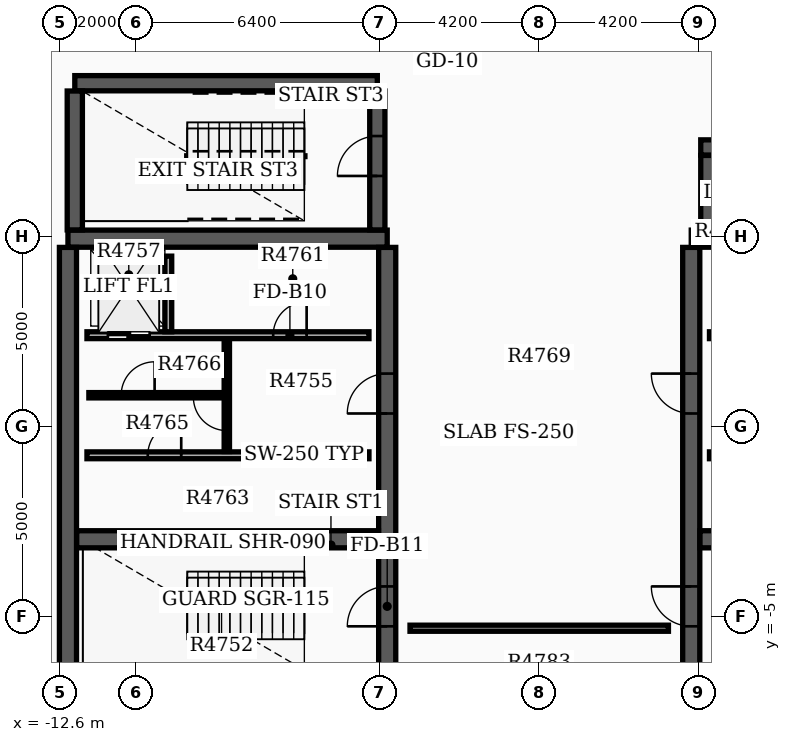
"""IFC4 building model, lengths in metres.
Left out: names, types, materials, properties, quantities, classifications, styles, units other than length and angle.
Written with IfcOpenShell. Run it as: python <this file> out.ifc"""

import sys

from ifc_helpers import new_model, si_unit, direction, frame, frame_2d, origin, place, context, subcontext, project, spatial, rectangle, extrude, element, fill, save


model = new_model("IFC4")
c1 = context("Model", 3, precision=1e-05, world=origin(), true_north=direction((0.0, 1.0)))
c2 = subcontext(c1, "Body", "Model", "MODEL_VIEW")
j1 = project(units=[si_unit("LENGTHUNIT", "METRE"), si_unit("PLANEANGLEUNIT", "RADIAN")], contexts=[c1])
p1 = place(None, origin())
s1 = spatial("IfcSite", under=j1, at=p1, CompositionType="ELEMENT")
p2 = place(p1, origin())
s2 = spatial("IfcBuilding", under=s1, at=p2, CompositionType="ELEMENT")
p3 = place(p2, frame((0.0, 0.0, 312.9)))
s3 = spatial("IfcBuildingStorey", under=s2, at=p3, CompositionType="ELEMENT", Elevation=312.9)
p4 = place(p3, frame((-12.4, 4.95, 0.0), z_axis=(0.0, 0.0, 1.0), x_axis=(1.0, 0.0, 0.0)))
e1 = element("IfcWall", 1, at=p4, inside=s3, PredefinedType="SHEAR", context=c2, shape_type="SweptSolid", body=[
    extrude(rectangle(XDim=8.4, YDim=0.45, at=frame_2d((4.2, 0.0))), origin(), (0.0, 0.0, 1.0), 4.25),
])
p5 = place(p3, frame((-12.4, -6.62, 0.0), z_axis=(0.0, 0.0, 1.0), x_axis=(0.0, 1.0, 0.0)))
e2 = element("IfcWall", 2, at=p5, inside=s3, PredefinedType="SHEAR", context=c2, shape_type="SweptSolid", body=[
    extrude(rectangle(XDim=11.34, YDim=0.45, at=frame_2d((5.67, 0.0))), origin(), (0.0, 0.0, 1.0), 4.25),
])
p6 = place(p3, frame((-4.0, -6.62, 0.0), z_axis=(0.0, 0.0, 1.0), x_axis=(0.0, 1.0, 0.0)))
e3 = element("IfcWall", 3, at=p6, inside=s3, PredefinedType="SHEAR", context=c2, shape_type="SweptSolid", body=[
    extrude(rectangle(XDim=11.34, YDim=0.45, at=frame_2d((5.67, 0.0))), origin(), (0.0, 0.0, 1.0), 4.25),
])
p7 = place(p6, frame((1.37, 0.0, 0.0)))
e4 = element("IfcOpeningElement", 4, at=p7, cuts=e3, PredefinedType="OPENING", context=c2, shape_type="SweptSolid", body=[
    extrude(rectangle(XDim=1.05, YDim=2.15, at=frame_2d((0.525, 1.075))), frame((0.0, 0.235, 0.0), z_axis=(0.0, -1.0, 0.0), x_axis=(1.0, 0.0, 0.0)), (0.0, 0.0, 1.0), 0.47),
])
p8 = place(p6, frame((6.97, 0.0, 0.0)))
e5 = element("IfcOpeningElement", 5, at=p8, cuts=e3, PredefinedType="OPENING", context=c2, shape_type="SweptSolid", body=[
    extrude(rectangle(XDim=1.05, YDim=2.15, at=frame_2d((0.525, 1.075))), frame((0.0, 0.235, 0.0), z_axis=(0.0, -1.0, 0.0), x_axis=(1.0, 0.0, 0.0)), (0.0, 0.0, 1.0), 0.47),
])
p9 = place(p3, frame((-12.17, -2.96, 0.0), z_axis=(0.0, 0.0, 1.0), x_axis=(1.0, 0.0, 0.0)))
e6 = element("IfcWall", 6, at=p9, inside=s3, PredefinedType="SHEAR", context=c2, shape_type="SweptSolid", body=[
    extrude(rectangle(XDim=7.94, YDim=0.45, at=frame_2d((3.97, 0.0))), origin(), (0.0, 0.0, 1.0), 4.25),
])
p10 = place(p3, frame((4.0, 4.95, 0.0), z_axis=(0.0, 0.0, 1.0), x_axis=(1.0, 0.0, 0.0)))
e7 = element("IfcWall", 7, at=p10, inside=s3, PredefinedType="SHEAR", context=c2, shape_type="SweptSolid", body=[
    extrude(rectangle(XDim=8.4, YDim=0.45, at=frame_2d((4.2, 0.0))), origin(), (0.0, 0.0, 1.0), 4.25),
])
p11 = place(p3, frame((4.0, -6.62, 0.0), z_axis=(0.0, 0.0, 1.0), x_axis=(0.0, 1.0, 0.0)))
e8 = element("IfcWall", 8, at=p11, inside=s3, PredefinedType="SHEAR", context=c2, shape_type="SweptSolid", body=[
    extrude(rectangle(XDim=11.34, YDim=0.45, at=frame_2d((5.67, 0.0))), origin(), (0.0, 0.0, 1.0), 4.25),
])
p12 = place(p11, frame((1.37, 0.0, 0.0)))
e9 = element("IfcOpeningElement", 9, at=p12, cuts=e8, PredefinedType="OPENING", context=c2, shape_type="SweptSolid", body=[
    extrude(rectangle(XDim=1.05, YDim=2.15, at=frame_2d((0.525, 1.075))), frame((0.0, 0.235, 0.0), z_axis=(0.0, -1.0, 0.0), x_axis=(1.0, 0.0, 0.0)), (0.0, 0.0, 1.0), 0.47),
])
p13 = place(p11, frame((6.97, 0.0, 0.0)))
e10 = element("IfcOpeningElement", 10, at=p13, cuts=e8, PredefinedType="OPENING", context=c2, shape_type="SweptSolid", body=[
    extrude(rectangle(XDim=1.05, YDim=2.15, at=frame_2d((0.525, 1.075))), frame((0.0, 0.235, 0.0), z_axis=(0.0, -1.0, 0.0), x_axis=(1.0, 0.0, 0.0)), (0.0, 0.0, 1.0), 0.47),
])
p14 = place(p3, frame((4.23, -2.96, 0.0), z_axis=(0.0, 0.0, 1.0), x_axis=(1.0, 0.0, 0.0)))
e11 = element("IfcWall", 11, at=p14, inside=s3, PredefinedType="SHEAR", context=c2, shape_type="SweptSolid", body=[
    extrude(rectangle(XDim=7.94, YDim=0.45, at=frame_2d((3.97, 0.0))), origin(), (0.0, 0.0, 1.0), 4.25),
])
p15 = place(p3, frame((-12.22, 9.04, 0.0), z_axis=(0.0, 0.0, 1.0), x_axis=(1.0, 0.0, 0.0)))
e12 = element("IfcWall", 12, at=p15, inside=s3, PredefinedType="SHEAR", context=c2, shape_type="SweptSolid", body=[
    extrude(rectangle(XDim=7.96, YDim=0.4, at=frame_2d((3.98, 0.0))), origin(), (0.0, 0.0, 1.0), 4.25),
])
p16 = place(p3, frame((-12.22, 5.18, 0.0), z_axis=(0.0, 0.0, 1.0), x_axis=(0.0, 1.0, 0.0)))
e13 = element("IfcWall", 13, at=p16, inside=s3, PredefinedType="SHEAR", context=c2, shape_type="SweptSolid", body=[
    extrude(rectangle(XDim=3.655, YDim=0.4, at=frame_2d((1.828, 0.0))), origin(), (0.0, 0.0, 1.0), 4.25),
])
p17 = place(p3, frame((-4.26, 5.18, 0.0), z_axis=(0.0, 0.0, 1.0), x_axis=(0.0, 1.0, 0.0)))
e14 = element("IfcWall", 14, at=p17, inside=s3, PredefinedType="SHEAR", context=c2, shape_type="SweptSolid", body=[
    extrude(rectangle(XDim=3.655, YDim=0.4, at=frame_2d((1.828, 0.0))), origin(), (0.0, 0.0, 1.0), 4.25),
])
p18 = place(p17, frame((1.42, 0.0, 0.0)))
e15 = element("IfcOpeningElement", 15, at=p18, cuts=e14, PredefinedType="OPENING", context=c2, shape_type="SweptSolid", body=[
    extrude(rectangle(XDim=1.05, YDim=2.15, at=frame_2d((0.525, 1.075))), frame((0.0, 0.21, 0.0), z_axis=(0.0, -1.0, 0.0), x_axis=(1.0, 0.0, 0.0)), (0.0, 0.0, 1.0), 0.42),
])
p19 = place(p3, frame((4.45, 5.18, 0.0), z_axis=(0.0, 0.0, 1.0), x_axis=(0.0, 1.0, 0.0)))
e16 = element("IfcWall", 16, at=p19, inside=s3, PredefinedType="SHEAR", context=c2, shape_type="SweptSolid", body=[
    extrude(rectangle(XDim=1.96, YDim=0.4, at=frame_2d((0.98, 0.0))), origin(), (0.0, 0.0, 1.0), 4.25),
])
p20 = place(p3, frame((4.25, 7.35, 0.0), z_axis=(0.0, 0.0, 1.0), x_axis=(1.0, 0.0, 0.0)))
e17 = element("IfcWall", 17, at=p20, inside=s3, PredefinedType="SHEAR", context=c2, shape_type="SweptSolid", body=[
    extrude(rectangle(XDim=5.4, YDim=0.4, at=frame_2d((2.7, 0.0))), origin(), (0.0, 0.0, 1.0), 4.25),
])
p21 = place(p20, frame((0.85, 0.0, 0.0)))
e18 = element("IfcOpeningElement", 18, at=p21, cuts=e17, PredefinedType="OPENING", context=c2, shape_type="SweptSolid", body=[
    extrude(rectangle(XDim=1.2, YDim=2.2, at=frame_2d((0.6, 1.1))), frame((0.0, 0.21, 0.0), z_axis=(0.0, -1.0, 0.0), x_axis=(1.0, 0.0, 0.0)), (0.0, 0.0, 1.0), 0.42),
])
p22 = place(p20, frame((3.25, 0.0, 0.0)))
e19 = element("IfcOpeningElement", 19, at=p22, cuts=e17, PredefinedType="OPENING", context=c2, shape_type="SweptSolid", body=[
    extrude(rectangle(XDim=1.2, YDim=2.2, at=frame_2d((0.6, 1.1))), frame((0.0, 0.21, 0.0), z_axis=(0.0, -1.0, 0.0), x_axis=(1.0, 0.0, 0.0)), (0.0, 0.0, 1.0), 0.42),
])
p23 = place(p3, frame((-11.9, 2.41, 0.0), z_axis=(0.0, 0.0, 1.0), x_axis=(1.0, 0.0, 0.0)))
e20 = element("IfcWall", 20, at=p23, inside=s3, PredefinedType="SOLIDWALL", context=c2, shape_type="SweptSolid", body=[
    extrude(rectangle(XDim=7.42, YDim=0.18, at=frame_2d((3.71, 0.0))), origin(), (0.0, 0.0, 1.0), 3.72),
])
p24 = place(p23, frame((0.55, 0.0, 0.0)))
e21 = element("IfcOpeningElement", 21, at=p24, cuts=e20, PredefinedType="OPENING", context=c2, shape_type="SweptSolid", body=[
    extrude(rectangle(XDim=1.1, YDim=2.15, at=frame_2d((0.55, 1.075))), frame((0.0, 0.1, 0.0), z_axis=(0.0, -1.0, 0.0), x_axis=(1.0, 0.0, 0.0)), (0.0, 0.0, 1.0), 0.2),
])
p25 = place(p23, frame((4.9, 0.0, 0.0)))
e22 = element("IfcOpeningElement", 22, at=p25, cuts=e20, PredefinedType="OPENING", context=c2, shape_type="SweptSolid", body=[
    extrude(rectangle(XDim=0.88, YDim=2.1, at=frame_2d((0.44, 1.05))), frame((0.0, 0.1, 0.0), z_axis=(0.0, -1.0, 0.0), x_axis=(1.0, 0.0, 0.0)), (0.0, 0.0, 1.0), 0.2),
])
p26 = place(p3, frame((4.48, 2.41, 0.0), z_axis=(0.0, 0.0, 1.0), x_axis=(1.0, 0.0, 0.0)))
e23 = element("IfcWall", 23, at=p26, inside=s3, PredefinedType="SOLIDWALL", context=c2, shape_type="SweptSolid", body=[
    extrude(rectangle(XDim=7.42, YDim=0.18, at=frame_2d((3.71, 0.0))), origin(), (0.0, 0.0, 1.0), 3.72),
])
p27 = place(p26, frame((5.67, 0.0, 0.0)))
e24 = element("IfcOpeningElement", 24, at=p27, cuts=e23, PredefinedType="OPENING", context=c2, shape_type="SweptSolid", body=[
    extrude(rectangle(XDim=1.1, YDim=2.15, at=frame_2d((0.55, 1.075))), frame((0.0, 0.1, 0.0), z_axis=(0.0, -1.0, 0.0), x_axis=(1.0, 0.0, 0.0)), (0.0, 0.0, 1.0), 0.2),
])
p28 = place(p26, frame((1.6, 0.0, 0.0)))
e25 = element("IfcOpeningElement", 25, at=p28, cuts=e23, PredefinedType="OPENING", context=c2, shape_type="SweptSolid", body=[
    extrude(rectangle(XDim=0.88, YDim=2.1, at=frame_2d((0.44, 1.05))), frame((0.0, 0.1, 0.0), z_axis=(0.0, -1.0, 0.0), x_axis=(1.0, 0.0, 0.0)), (0.0, 0.0, 1.0), 0.2),
])
p29 = place(p3, frame((-11.9, -0.75, 0.0), z_axis=(0.0, 0.0, 1.0), x_axis=(1.0, 0.0, 0.0)))
e26 = element("IfcWall", 26, at=p29, inside=s3, PredefinedType="SOLIDWALL", context=c2, shape_type="SweptSolid", body=[
    extrude(rectangle(XDim=7.42, YDim=0.18, at=frame_2d((3.71, 0.0))), origin(), (0.0, 0.0, 1.0), 3.72),
])
p30 = place(p29, frame((1.6, 0.0, 0.0)))
e27 = element("IfcOpeningElement", 27, at=p30, cuts=e26, PredefinedType="OPENING", context=c2, shape_type="SweptSolid", body=[
    extrude(rectangle(XDim=0.88, YDim=2.1, at=frame_2d((0.44, 1.05))), frame((0.0, 0.1, 0.0), z_axis=(0.0, -1.0, 0.0), x_axis=(1.0, 0.0, 0.0)), (0.0, 0.0, 1.0), 0.2),
])
p31 = place(p3, frame((4.48, -0.75, 0.0), z_axis=(0.0, 0.0, 1.0), x_axis=(1.0, 0.0, 0.0)))
e28 = element("IfcWall", 28, at=p31, inside=s3, PredefinedType="SOLIDWALL", context=c2, shape_type="SweptSolid", body=[
    extrude(rectangle(XDim=7.42, YDim=0.18, at=frame_2d((3.71, 0.0))), origin(), (0.0, 0.0, 1.0), 3.72),
])
p32 = place(p31, frame((1.6, 0.0, 0.0)))
e29 = element("IfcOpeningElement", 29, at=p32, cuts=e28, PredefinedType="OPENING", context=c2, shape_type="SweptSolid", body=[
    extrude(rectangle(XDim=0.88, YDim=2.1, at=frame_2d((0.44, 1.05))), frame((0.0, 0.1, 0.0), z_axis=(0.0, -1.0, 0.0), x_axis=(1.0, 0.0, 0.0)), (0.0, 0.0, 1.0), 0.2),
])
p33 = place(p3, frame((-9.76, 2.5, 0.0), z_axis=(0.0, 0.0, 1.0), x_axis=(0.0, 1.0, 0.0)))
e30 = element("IfcWall", 30, at=p33, inside=s3, PredefinedType="SOLIDWALL", context=c2, shape_type="SweptSolid", body=[
    extrude(rectangle(XDim=1.99, YDim=0.18, at=frame_2d((0.995, 0.0))), origin(), (0.0, 0.0, 1.0), 3.72),
])
p34 = place(p3, frame((-8.22, -0.65, 0.0), z_axis=(0.0, 0.0, 1.0), x_axis=(0.0, 1.0, 0.0)))
e31 = element("IfcWall", 31, at=p34, inside=s3, PredefinedType="SOLIDWALL", context=c2, shape_type="SweptSolid", body=[
    extrude(rectangle(XDim=2.96, YDim=0.14, at=frame_2d((1.48, 0.0))), origin(), (0.0, 0.0, 1.0), 3.72),
])
p35 = place(p34, frame((0.55, 0.0, 0.0)))
e32 = element("IfcOpeningElement", 32, at=p35, cuts=e31, PredefinedType="OPENING", context=c2, shape_type="SweptSolid", body=[
    extrude(rectangle(XDim=0.88, YDim=2.1, at=frame_2d((0.44, 1.05))), frame((0.0, 0.08, 0.0), z_axis=(0.0, -1.0, 0.0), x_axis=(1.0, 0.0, 0.0)), (0.0, 0.0, 1.0), 0.16),
])
p36 = place(p3, frame((-11.85, 0.83, 0.0), z_axis=(0.0, 0.0, 1.0), x_axis=(1.0, 0.0, 0.0)))
e33 = element("IfcWall", 33, at=p36, inside=s3, PredefinedType="PARTITIONING", context=c2, shape_type="SweptSolid", body=[
    extrude(rectangle(XDim=3.552, YDim=0.14, at=frame_2d((1.776, 0.0))), origin(), (0.0, 0.0, 1.0), 3.72),
])
p37 = place(p36, frame((0.85, 0.0, 0.0)))
e34 = element("IfcOpeningElement", 34, at=p37, cuts=e33, PredefinedType="OPENING", context=c2, shape_type="SweptSolid", body=[
    extrude(rectangle(XDim=0.88, YDim=2.1, at=frame_2d((0.44, 1.05))), frame((0.0, 0.08, 0.0), z_axis=(0.0, -1.0, 0.0), x_axis=(1.0, 0.0, 0.0)), (0.0, 0.0, 1.0), 0.16),
])
p38 = place(p3, frame((-3.4, -5.3, 0.0), z_axis=(0.0, 0.0, 1.0), x_axis=(1.0, 0.0, 0.0)))
e35 = element("IfcWall", 35, at=p38, inside=s3, PredefinedType="PARTITIONING", context=c2, shape_type="SweptSolid", body=[
    extrude(rectangle(XDim=6.8, YDim=0.16, at=frame_2d((3.4, 0.0))), origin(), (0.0, 0.0, 1.0), 3.72),
])
p39 = place(p7, origin())
e36 = element("IfcDoor", 36, at=p39, inside=s3, OperationType="SINGLE_SWING_LEFT", PredefinedType="DOOR", context=c2, shape_type="SweptSolid", body=[
    extrude(rectangle(XDim=1.05, YDim=2.15, at=frame_2d((0.525, 1.075))), frame((0.0, 0.025, 0.0), z_axis=(0.0, -1.0, 0.0), x_axis=(1.0, 0.0, 0.0)), (0.0, 0.0, 1.0), 0.05),
])
fill(e4, e36)
p40 = place(p12, origin())
e37 = element("IfcDoor", 37, at=p40, inside=s3, OperationType="SINGLE_SWING_RIGHT", PredefinedType="DOOR", context=c2, shape_type="SweptSolid", body=[
    extrude(rectangle(XDim=1.05, YDim=2.15, at=frame_2d((0.525, 1.075))), frame((0.0, 0.025, 0.0), z_axis=(0.0, -1.0, 0.0), x_axis=(1.0, 0.0, 0.0)), (0.0, 0.0, 1.0), 0.05),
])
fill(e9, e37)
p41 = place(p8, origin())
e38 = element("IfcDoor", 38, at=p41, inside=s3, OperationType="SINGLE_SWING_LEFT", PredefinedType="DOOR", context=c2, shape_type="SweptSolid", body=[
    extrude(rectangle(XDim=1.05, YDim=2.15, at=frame_2d((0.525, 1.075))), frame((0.0, 0.025, 0.0), z_axis=(0.0, -1.0, 0.0), x_axis=(1.0, 0.0, 0.0)), (0.0, 0.0, 1.0), 0.05),
])
fill(e5, e38)
p42 = place(p13, origin())
e39 = element("IfcDoor", 39, at=p42, inside=s3, OperationType="SINGLE_SWING_RIGHT", PredefinedType="DOOR", context=c2, shape_type="SweptSolid", body=[
    extrude(rectangle(XDim=1.05, YDim=2.15, at=frame_2d((0.525, 1.075))), frame((0.0, 0.025, 0.0), z_axis=(0.0, -1.0, 0.0), x_axis=(1.0, 0.0, 0.0)), (0.0, 0.0, 1.0), 0.05),
])
fill(e10, e39)
p43 = place(p18, origin())
e40 = element("IfcDoor", 40, at=p43, inside=s3, OperationType="SINGLE_SWING_LEFT", PredefinedType="DOOR", context=c2, shape_type="SweptSolid", body=[
    extrude(rectangle(XDim=1.05, YDim=2.15, at=frame_2d((0.525, 1.075))), frame((0.0, 0.025, 0.0), z_axis=(0.0, -1.0, 0.0), x_axis=(1.0, 0.0, 0.0)), (0.0, 0.0, 1.0), 0.05),
])
fill(e15, e40)
p44 = place(p24, origin())
e41 = element("IfcDoor", 41, at=p44, inside=s3, OperationType="DOUBLE_DOOR_SLIDING", PredefinedType="DOOR", context=c2, shape_type="SweptSolid", body=[
    extrude(rectangle(XDim=1.1, YDim=2.15, at=frame_2d((0.55, 1.075))), frame((0.0, 0.025, 0.0), z_axis=(0.0, -1.0, 0.0), x_axis=(1.0, 0.0, 0.0)), (0.0, 0.0, 1.0), 0.05),
])
fill(e21, e41)
p45 = place(p25, origin())
e42 = element("IfcDoor", 42, at=p45, inside=s3, OperationType="SINGLE_SWING_RIGHT", PredefinedType="DOOR", context=c2, shape_type="SweptSolid", body=[
    extrude(rectangle(XDim=0.88, YDim=2.1, at=frame_2d((0.44, 1.05))), frame((0.0, 0.025, 0.0), z_axis=(0.0, -1.0, 0.0), x_axis=(1.0, 0.0, 0.0)), (0.0, 0.0, 1.0), 0.05),
])
fill(e22, e42)
p46 = place(p30, origin())
e43 = element("IfcDoor", 43, at=p46, inside=s3, OperationType="SINGLE_SWING_RIGHT", PredefinedType="DOOR", context=c2, shape_type="SweptSolid", body=[
    extrude(rectangle(XDim=0.88, YDim=2.1, at=frame_2d((0.44, 1.05))), frame((0.0, 0.025, 0.0), z_axis=(0.0, -1.0, 0.0), x_axis=(1.0, 0.0, 0.0)), (0.0, 0.0, 1.0), 0.05),
])
fill(e27, e43)
p47 = place(p35, origin())
e44 = element("IfcDoor", 44, at=p47, inside=s3, OperationType="SINGLE_SWING_RIGHT", PredefinedType="DOOR", context=c2, shape_type="SweptSolid", body=[
    extrude(rectangle(XDim=0.88, YDim=2.1, at=frame_2d((0.44, 1.05))), frame((0.0, 0.025, 0.0), z_axis=(0.0, -1.0, 0.0), x_axis=(1.0, 0.0, 0.0)), (0.0, 0.0, 1.0), 0.05),
])
fill(e32, e44)
p48 = place(p37, origin())
e45 = element("IfcDoor", 45, at=p48, inside=s3, OperationType="SINGLE_SWING_RIGHT", PredefinedType="DOOR", context=c2, shape_type="SweptSolid", body=[
    extrude(rectangle(XDim=0.88, YDim=2.1, at=frame_2d((0.44, 1.05))), frame((0.0, 0.025, 0.0), z_axis=(0.0, -1.0, 0.0), x_axis=(1.0, 0.0, 0.0)), (0.0, 0.0, 1.0), 0.05),
])
fill(e34, e45)
save(model, sys.argv[1])
